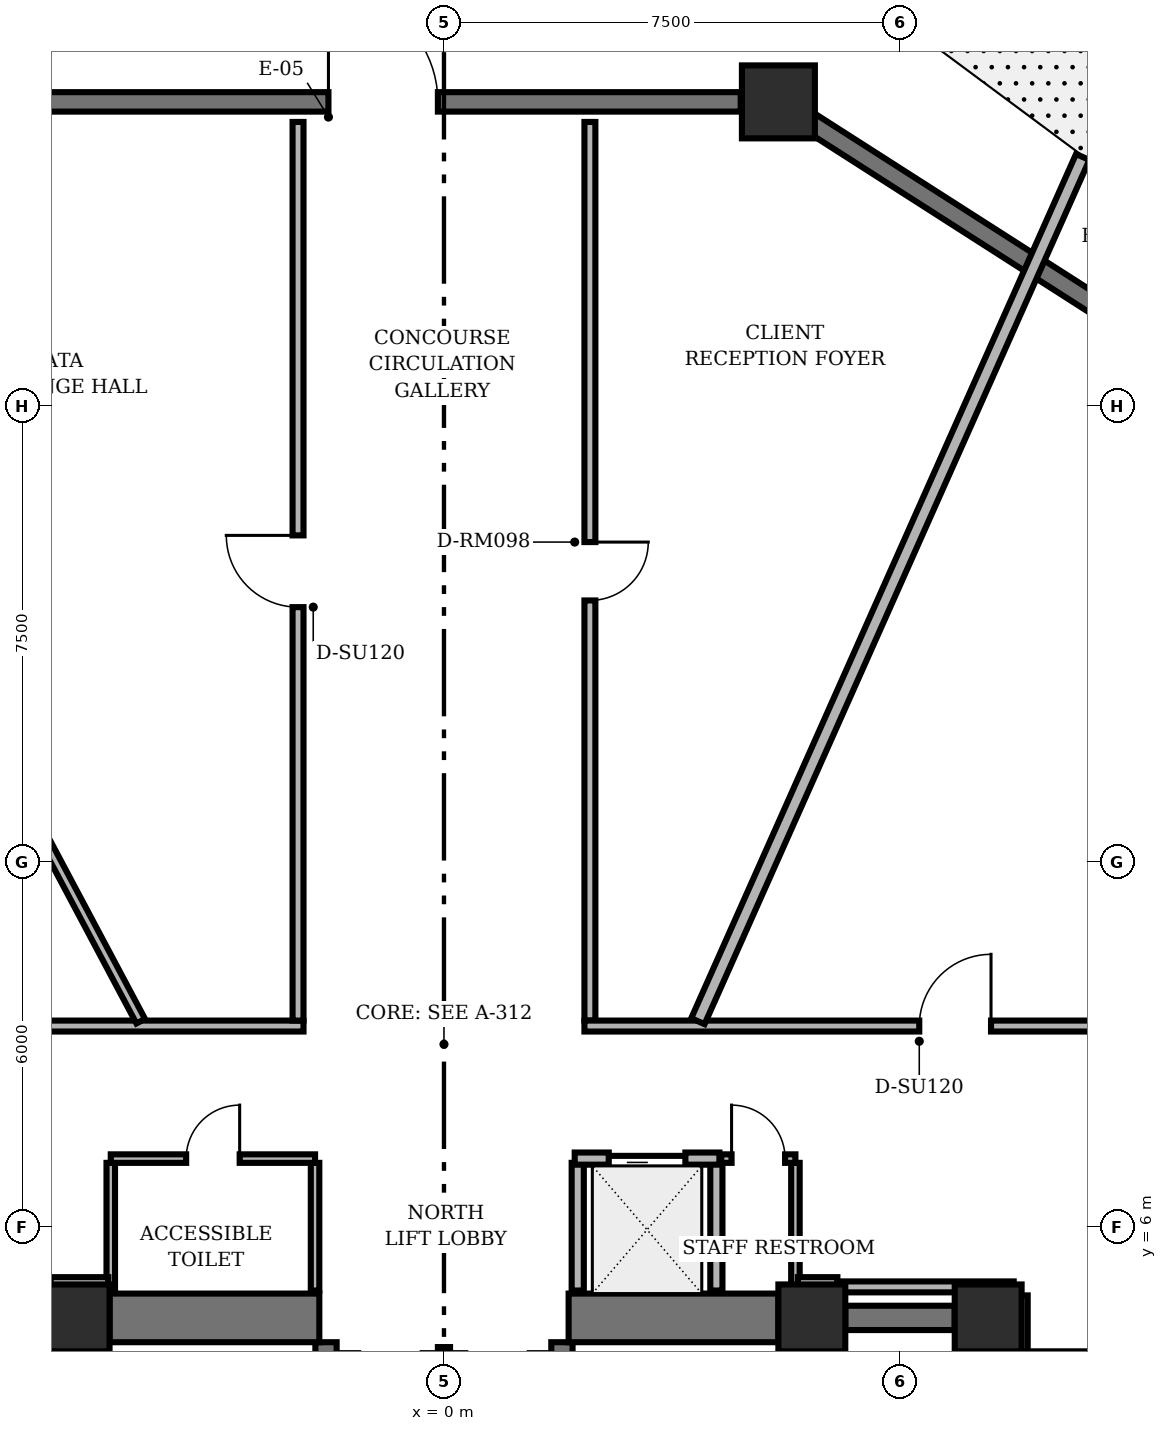
"""IFC4 building model, lengths in metres.
Left out: names, types, materials, properties, quantities, classifications, styles, units other than length and angle.
Written with IfcOpenShell. Run it as: python <this file> out.ifc"""

import sys

from ifc_helpers import new_model, si_unit, direction, frame, frame_2d, origin, origin_2d, place, context, subcontext, project, spatial, rectangle, hollow_rectangle, extrude, element, fill, save


model = new_model("IFC4")
c1 = context("Model", 3, precision=1e-05, world=origin(), true_north=direction((0.0, 1.0)))
c2 = subcontext(c1, "Body", "Model", "MODEL_VIEW")
j1 = project(units=[si_unit("LENGTHUNIT", "METRE"), si_unit("PLANEANGLEUNIT", "RADIAN")], contexts=[c1])
p1 = place(None, origin())
s1 = spatial("IfcSite", under=j1, at=p1, CompositionType="ELEMENT")
p2 = place(p1, origin())
s2 = spatial("IfcBuilding", under=s1, at=p2, CompositionType="ELEMENT")
p3 = place(p2, origin())
s3 = spatial("IfcBuildingStorey", under=s2, at=p3, CompositionType="ELEMENT", Elevation=0.0)
for number, where, z_axis, x_axis in (
    (1, (-6.05, 4.5, 0.0), (0.0, 0.0, 1.0), (1.0, 0.0, 0.0)),
    (2, (6.05, 4.5, 0.0), (0.0, 0.0, 1.0), (1.0, 0.0, 0.0)),
    (3, (8.95, 4.5, 0.0), (0.0, 0.0, 1.0), (1.0, 0.0, 0.0)),
):
    element("IfcColumn", number, at=place(p3, frame(where, z_axis=z_axis, x_axis=x_axis)), inside=s3, PredefinedType="COLUMN", context=c2, shape_type="SweptSolid", body=[
        extrude(hollow_rectangle(XDim=1.1, YDim=1.1, WallThickness=0.07, InnerFilletRadius=0.02, OuterFilletRadius=0.04, at=origin_2d()), origin(), (0.0, 0.0, 1.0), 4.8),
    ])
for number, where, z_axis, x_axis in (
    (4, (-1.94, -4.1, 0.0), (0.0, 0.0, 1.0), (0.0, 1.0, 0.0)),
    (5, (1.94, -4.1, 0.0), (0.0, 0.0, 1.0), (0.0, 1.0, 0.0)),
):
    element("IfcWall", number, at=place(p3, frame(where, z_axis=z_axis, x_axis=x_axis)), inside=s3, PredefinedType="SHEAR", context=c2, shape_type="SweptSolid", body=[
        extrude(rectangle(XDim=8.2, YDim=0.35, at=frame_2d((4.1, 0.0))), origin(), (0.0, 0.0, 1.0), 4.498),
    ])
for number, where, z_axis, x_axis in (
    (6, (-5.5, 4.5, 0.0), (0.0, 0.0, 1.0), (1.0, 0.0, 0.0)),
    (7, (2.05, 4.5, 0.0), (0.0, 0.0, 1.0), (1.0, 0.0, 0.0)),
):
    element("IfcWall", number, at=place(p3, frame(where, z_axis=z_axis, x_axis=x_axis)), inside=s3, PredefinedType="SHEAR", context=c2, shape_type="SweptSolid", body=[
        extrude(rectangle(XDim=3.45, YDim=0.8, at=frame_2d((1.725, 0.0))), origin(), (0.0, 0.0, 1.0), 4.498),
    ])
p4 = place(p3, frame((8.95, -3.75, 0.0), z_axis=(0.0, 0.0, 1.0), x_axis=(0.0, 1.0, 0.0)))
e8 = element("IfcWall", 8, at=p4, inside=s3, PredefinedType="SHEAR", context=c2, shape_type="SweptSolid", body=[
    extrude(rectangle(XDim=7.7, YDim=0.8, at=frame_2d((3.85, 0.0))), origin(), (0.0, 0.0, 1.0), 4.498),
])
p5 = place(p4, frame((0.55, 0.0, 0.0)))
e9 = element("IfcOpeningElement", 9, at=p5, cuts=e8, PredefinedType="OPENING", context=c2, shape_type="SweptSolid", body=[
    extrude(rectangle(XDim=1.06, YDim=2.04, at=frame_2d((0.53, 1.02))), frame((0.0, 0.41, 0.0), z_axis=(0.0, -1.0, 0.0), x_axis=(1.0, 0.0, 0.0)), (0.0, 0.0, 1.0), 0.82),
])
p6 = place(p4, frame((3.32, 0.0, 0.0)))
e10 = element("IfcOpeningElement", 10, at=p6, cuts=e8, PredefinedType="OPENING", context=c2, shape_type="SweptSolid", body=[
    extrude(rectangle(XDim=1.06, YDim=2.04, at=frame_2d((0.53, 1.02))), frame((0.0, 0.41, 0.0), z_axis=(0.0, -1.0, 0.0), x_axis=(1.0, 0.0, 0.0)), (0.0, 0.0, 1.0), 0.82),
])
p7 = place(p4, frame((6.08, 0.0, 0.0)))
e11 = element("IfcOpeningElement", 11, at=p7, cuts=e8, PredefinedType="OPENING", context=c2, shape_type="SweptSolid", body=[
    extrude(rectangle(XDim=1.06, YDim=2.04, at=frame_2d((0.53, 1.02))), frame((0.0, 0.41, 0.0), z_axis=(0.0, -1.0, 0.0), x_axis=(1.0, 0.0, 0.0)), (0.0, 0.0, 1.0), 0.82),
])
p8 = place(p3, frame((6.6, 4.5, 0.0), z_axis=(0.0, 0.0, 1.0), x_axis=(1.0, 0.0, 0.0)))
e12 = element("IfcWall", 12, at=p8, inside=s3, PredefinedType="SHEAR", context=c2, shape_type="SweptSolid", body=[
    extrude(rectangle(XDim=1.8, YDim=0.4, at=frame_2d((0.9, 0.0))), origin(), (0.0, 0.0, 1.0), 4.498),
])
p9 = place(p3, frame((5.5, 24.5, 0.0), z_axis=(0.0, 0.0, 1.0), x_axis=(1.0, 0.0, 0.0)))
e13 = element("IfcColumn", 13, at=p9, inside=s3, PredefinedType="COLUMN", context=c2, shape_type="SweptSolid", body=[
    extrude(rectangle(XDim=1.2, YDim=1.2, at=origin_2d()), origin(), (0.0, 0.0, 1.0), 4.8),
])
p10 = place(p3, frame((6.022, 24.166, 0.0), z_axis=(0.0, 0.0, 1.0), x_axis=(0.842272052664, -0.539052677667, 0.0)))
e14 = element("IfcWall", 14, at=p10, inside=s3, PredefinedType="SOLIDWALL", context=c2, shape_type="SweptSolid", body=[
    extrude(rectangle(XDim=13.601, YDim=0.32, at=frame_2d((6.8, 0.0))), origin(), (0.0, 0.0, 1.0), 3.868),
])
p11 = place(p10, frame((5.9, 0.0, 0.0)))
e15 = element("IfcOpeningElement", 15, at=p11, cuts=e14, PredefinedType="OPENING", context=c2, shape_type="SweptSolid", body=[
    extrude(rectangle(XDim=1.8, YDim=2.3, at=frame_2d((0.9, 1.15))), frame((0.0, 0.17, 0.0), z_axis=(0.0, -1.0, 0.0), x_axis=(1.0, 0.0, 0.0)), (0.0, 0.0, 1.0), 0.34),
])
p12 = place(p3, frame((-6.88, 24.5, 0.0), z_axis=(0.0, 0.0, 1.0), x_axis=(1.0, 0.0, 0.0)))
e16 = element("IfcWall", 16, at=p12, inside=s3, PredefinedType="SOLIDWALL", context=c2, shape_type="SweptSolid", body=[
    extrude(rectangle(XDim=11.76, YDim=0.32, at=frame_2d((5.88, 0.0))), origin(), (0.0, 0.0, 1.0), 3.868),
])
p13 = place(p12, frame((4.98, 0.0, 0.0)))
e17 = element("IfcOpeningElement", 17, at=p13, cuts=e16, PredefinedType="OPENING", context=c2, shape_type="SweptSolid", body=[
    extrude(rectangle(XDim=1.8, YDim=2.3, at=frame_2d((0.9, 1.15))), frame((0.0, 0.17, 0.0), z_axis=(0.0, -1.0, 0.0), x_axis=(1.0, 0.0, 0.0)), (0.0, 0.0, 1.0), 0.34),
])
p14 = place(p3, frame((0.0, 1.25, 0.0), z_axis=(0.0, 0.0, 1.0), x_axis=(0.0, 1.0, 0.0)))
e18 = element("IfcWall", 18, at=p14, inside=s3, PredefinedType="PARTITIONING", context=c2, shape_type="SweptSolid", body=[
    extrude(rectangle(XDim=2.77, YDim=0.2, at=frame_2d((1.385, 0.0))), origin(), (0.0, 0.0, 1.0), 4.473),
])
for number, where, z_axis, x_axis in (
    (19, (2.2, 4.95, 0.0), (0.0, 0.0, 1.0), (0.0, 1.0, 0.0)),
    (20, (4.48, 4.95, 0.0), (0.0, 0.0, 1.0), (0.0, 1.0, 0.0)),
):
    element("IfcWall", number, at=place(p3, frame(where, z_axis=z_axis, x_axis=x_axis)), inside=s3, PredefinedType="PARTITIONING", context=c2, shape_type="SweptSolid", body=[
        extrude(rectangle(XDim=2.1, YDim=0.2, at=frame_2d((1.05, 0.0))), origin(), (0.0, 0.0, 1.0), 4.473),
    ])
p15 = place(p3, frame((2.15, 7.12, 0.0), z_axis=(0.0, 0.0, 1.0), x_axis=(1.0, 0.0, 0.0)))
e21 = element("IfcWall", 21, at=p15, inside=s3, PredefinedType="PARTITIONING", context=c2, shape_type="SweptSolid", body=[
    extrude(rectangle(XDim=2.38, YDim=0.2, at=frame_2d((1.19, 0.0))), origin(), (0.0, 0.0, 1.0), 4.473),
])
p16 = place(p15, frame((0.56, 0.0, 0.0)))
e22 = element("IfcOpeningElement", 22, at=p16, cuts=e21, PredefinedType="OPENING", context=c2, shape_type="SweptSolid", body=[
    extrude(rectangle(XDim=1.26, YDim=2.06, at=frame_2d((0.63, 1.03))), frame((0.0, 0.11, 0.0), z_axis=(0.0, -1.0, 0.0), x_axis=(1.0, 0.0, 0.0)), (0.0, 0.0, 1.0), 0.22),
])
for number, where, z_axis, x_axis in (
    (23, (-5.48, 4.95, 0.0), (0.0, 0.0, 1.0), (0.0, 1.0, 0.0)),
    (24, (-2.12, 4.95, 0.0), (0.0, 0.0, 1.0), (0.0, 1.0, 0.0)),
):
    element("IfcWall", number, at=place(p3, frame(where, z_axis=z_axis, x_axis=x_axis)), inside=s3, PredefinedType="PARTITIONING", context=c2, shape_type="SweptSolid", body=[
        extrude(rectangle(XDim=2.1, YDim=0.14, at=frame_2d((1.05, 0.0))), origin(), (0.0, 0.0, 1.0), 4.473),
    ])
p17 = place(p3, frame((-5.48, 7.12, 0.0), z_axis=(0.0, 0.0, 1.0), x_axis=(1.0, 0.0, 0.0)))
e25 = element("IfcWall", 25, at=p17, inside=s3, PredefinedType="PARTITIONING", context=c2, shape_type="SweptSolid", body=[
    extrude(rectangle(XDim=3.36, YDim=0.14, at=frame_2d((1.68, 0.0))), origin(), (0.0, 0.0, 1.0), 4.473),
])
p18 = place(p17, frame((1.24, 0.0, 0.0)))
e26 = element("IfcOpeningElement", 26, at=p18, cuts=e25, PredefinedType="OPENING", context=c2, shape_type="SweptSolid", body=[
    extrude(rectangle(XDim=0.88, YDim=2.02, at=frame_2d((0.44, 1.01))), frame((0.0, 0.08, 0.0), z_axis=(0.0, -1.0, 0.0), x_axis=(1.0, 0.0, 0.0)), (0.0, 0.0, 1.0), 0.16),
])
p19 = place(p3, frame((5.78, 4.95, 0.0), z_axis=(0.0, 0.0, 1.0), x_axis=(0.0, 1.0, 0.0)))
e27 = element("IfcWall", 27, at=p19, inside=s3, PredefinedType="PARTITIONING", context=c2, shape_type="SweptSolid", body=[
    extrude(rectangle(XDim=2.1, YDim=0.14, at=frame_2d((1.05, 0.0))), origin(), (0.0, 0.0, 1.0), 3.598),
])
p20 = place(p3, frame((4.56, 7.12, 0.0), z_axis=(0.0, 0.0, 1.0), x_axis=(1.0, 0.0, 0.0)))
e28 = element("IfcWall", 28, at=p20, inside=s3, PredefinedType="PARTITIONING", context=c2, shape_type="SweptSolid", body=[
    extrude(rectangle(XDim=1.22, YDim=0.14, at=frame_2d((0.61, 0.0))), origin(), (0.0, 0.0, 1.0), 4.473),
])
p21 = place(p20, frame((0.17, 0.0, 0.0)))
e29 = element("IfcOpeningElement", 29, at=p21, cuts=e28, PredefinedType="OPENING", context=c2, shape_type="SweptSolid", body=[
    extrude(rectangle(XDim=0.88, YDim=2.02, at=frame_2d((0.44, 1.01))), frame((0.0, 0.08, 0.0), z_axis=(0.0, -1.0, 0.0), x_axis=(1.0, 0.0, 0.0)), (0.0, 0.0, 1.0), 0.16),
])
p22 = place(p3, frame((-12.89, 9.3, 0.0), z_axis=(0.0, 0.0, 1.0), x_axis=(1.0, 0.0, 0.0)))
e30 = element("IfcWall", 30, at=p22, inside=s3, PredefinedType="PARTITIONING", context=c2, shape_type="SweptSolid", body=[
    extrude(rectangle(XDim=10.58, YDim=0.18, at=frame_2d((5.29, 0.0))), origin(), (0.0, 0.0, 1.0), 3.987),
])
p23 = place(p22, frame((3.566, 0.0, 0.0)))
e31 = element("IfcOpeningElement", 31, at=p23, cuts=e30, PredefinedType="OPENING", context=c2, shape_type="SweptSolid", body=[
    extrude(rectangle(XDim=1.02, YDim=2.02, at=frame_2d((0.51, 1.01))), frame((0.0, 0.1, 0.0), z_axis=(0.0, -1.0, 0.0), x_axis=(1.0, 0.0, 0.0)), (0.0, 0.0, 1.0), 0.2),
])
p24 = place(p3, frame((-2.4, 9.39, 0.0), z_axis=(0.0, 0.0, 1.0), x_axis=(0.0, 1.0, 0.0)))
e32 = element("IfcWall", 32, at=p24, inside=s3, PredefinedType="PARTITIONING", context=c2, shape_type="SweptSolid", body=[
    extrude(rectangle(XDim=14.78, YDim=0.18, at=frame_2d((7.39, 0.0))), origin(), (0.0, 0.0, 1.0), 4.473),
])
p25 = place(p24, frame((6.8, 0.0, 0.0)))
e33 = element("IfcOpeningElement", 33, at=p25, cuts=e32, PredefinedType="OPENING", context=c2, shape_type="SweptSolid", body=[
    extrude(rectangle(XDim=1.18, YDim=2.02, at=frame_2d((0.59, 1.01))), frame((0.0, 0.1, 0.0), z_axis=(0.0, -1.0, 0.0), x_axis=(1.0, 0.0, 0.0)), (0.0, 0.0, 1.0), 0.2),
])
p26 = place(p3, frame((2.4, 24.17, 0.0), z_axis=(0.0, 0.0, 1.0), x_axis=(0.0, -1.0, 0.0)))
e34 = element("IfcWall", 34, at=p26, inside=s3, PredefinedType="PARTITIONING", context=c2, shape_type="SweptSolid", body=[
    extrude(rectangle(XDim=14.78, YDim=0.18, at=frame_2d((7.39, 0.0))), origin(), (0.0, 0.0, 1.0), 4.473),
])
p27 = place(p26, frame((6.91, 0.0, 0.0)))
e35 = element("IfcOpeningElement", 35, at=p27, cuts=e34, PredefinedType="OPENING", context=c2, shape_type="SweptSolid", body=[
    extrude(rectangle(XDim=0.96, YDim=2.02, at=frame_2d((0.48, 1.01))), frame((0.0, 0.1, 0.0), z_axis=(0.0, -1.0, 0.0), x_axis=(1.0, 0.0, 0.0)), (0.0, 0.0, 1.0), 0.2),
])
p28 = place(p3, frame((2.31, 9.3, 0.0), z_axis=(0.0, 0.0, 1.0), x_axis=(1.0, 0.0, 0.0)))
e36 = element("IfcWall", 36, at=p28, inside=s3, PredefinedType="PARTITIONING", context=c2, shape_type="SweptSolid", body=[
    extrude(rectangle(XDim=10.58, YDim=0.18, at=frame_2d((5.29, 0.0))), origin(), (0.0, 0.0, 1.0), 3.987),
])
p29 = place(p28, frame((5.507, 0.0, 0.0)))
e37 = element("IfcOpeningElement", 37, at=p29, cuts=e36, PredefinedType="OPENING", context=c2, shape_type="SweptSolid", body=[
    extrude(rectangle(XDim=1.18, YDim=2.02, at=frame_2d((0.59, 1.01))), frame((0.0, 0.1, 0.0), z_axis=(0.0, -1.0, 0.0), x_axis=(1.0, 0.0, 0.0)), (0.0, 0.0, 1.0), 0.2),
])
p30 = place(p3, frame((10.97, 3.86, 0.0), z_axis=(0.0, 0.0, 1.0), x_axis=(-1.0, 0.0, 0.0)))
e38 = element("IfcWall", 38, at=p30, inside=s3, PredefinedType="PARTITIONING", context=c2, shape_type="SweptSolid", body=[
    extrude(rectangle(XDim=1.55, YDim=0.18, at=frame_2d((0.775, 0.0))), origin(), (0.0, 0.0, 1.0), 4.473),
])
p31 = place(p3, frame((9.51, 3.95, 0.0), z_axis=(0.0, 0.0, 1.0), x_axis=(0.0, 1.0, 0.0)))
e39 = element("IfcWall", 39, at=p31, inside=s3, PredefinedType="PARTITIONING", context=c2, shape_type="SweptSolid", body=[
    extrude(rectangle(XDim=0.92, YDim=0.18, at=frame_2d((0.46, 0.0))), origin(), (0.0, 0.0, 1.0), 4.473),
])
p32 = place(p3, frame((9.37, 5.01, 0.0), z_axis=(0.0, 0.0, 1.0), x_axis=(-1.0, 0.0, 0.0)))
e40 = element("IfcWall", 40, at=p32, inside=s3, PredefinedType="PARTITIONING", context=c2, shape_type="SweptSolid", body=[
    extrude(rectangle(XDim=2.808, YDim=0.18, at=frame_2d((1.404, 0.0))), origin(), (0.0, 0.0, 1.0), 4.473),
])
p33 = place(p3, frame((6.47, 5.08, 0.0), z_axis=(0.0, 0.0, 1.0), x_axis=(-1.0, 0.0, 0.0)))
e41 = element("IfcWall", 41, at=p33, inside=s3, PredefinedType="PARTITIONING", context=c2, shape_type="SweptSolid", body=[
    extrude(rectangle(XDim=0.65, YDim=0.18, at=frame_2d((0.325, 0.0))), origin(), (0.0, 0.0, 1.0), 4.473),
])
p34 = place(p3, frame((-5.52, 5.08, 0.0), z_axis=(0.0, 0.0, 1.0), x_axis=(-1.0, 0.0, 0.0)))
e42 = element("IfcWall", 42, at=p34, inside=s3, PredefinedType="PARTITIONING", context=c2, shape_type="SweptSolid", body=[
    extrude(rectangle(XDim=0.95, YDim=0.18, at=frame_2d((0.475, 0.0))), origin(), (0.0, 0.0, 1.0), 4.473),
])
p35 = place(p3, frame((4.176, 9.38, 0.0), z_axis=(0.0, 0.0, 1.0), x_axis=(0.406726574704, 0.913549940304, 0.0)))
e43 = element("IfcWall", 43, at=p35, inside=s3, PredefinedType="PARTITIONING", context=c2, shape_type="SweptSolid", body=[
    extrude(rectangle(XDim=15.559, YDim=0.24, at=frame_2d((7.779, 0.0))), origin(), (0.0, 0.0, 1.0), 4.473),
])
p36 = place(p3, frame((-4.987, 9.38, 0.0), z_axis=(0.0, 0.0, 1.0), x_axis=(-0.469474122014, 0.882946232088, 0.0)))
e44 = element("IfcWall", 44, at=p36, inside=s3, PredefinedType="PARTITIONING", context=c2, shape_type="SweptSolid", body=[
    extrude(rectangle(XDim=19.888, YDim=0.16, at=frame_2d((9.944, 0.0))), origin(), (0.0, 0.0, 1.0), 4.473),
])
p37 = place(p13, origin())
e45 = element("IfcDoor", 45, at=p37, inside=s3, OperationType="SINGLE_SWING_LEFT", PredefinedType="DOOR", context=c2, shape_type="SweptSolid", body=[
    extrude(rectangle(XDim=1.8, YDim=2.3, at=frame_2d((0.9, 1.15))), frame((0.0, 0.025, 0.0), z_axis=(0.0, -1.0, 0.0), x_axis=(1.0, 0.0, 0.0)), (0.0, 0.0, 1.0), 0.05),
])
fill(e17, e45)
p38 = place(p16, origin())
e46 = element("IfcDoor", 46, at=p38, inside=s3, OperationType="SLIDING_TO_LEFT", PredefinedType="DOOR", context=c2, shape_type="SweptSolid", body=[
    extrude(rectangle(XDim=1.26, YDim=2.06, at=frame_2d((0.63, 1.03))), frame((0.0, 0.025, 0.0), z_axis=(0.0, -1.0, 0.0), x_axis=(1.0, 0.0, 0.0)), (0.0, 0.0, 1.0), 0.05),
])
fill(e22, e46)
p39 = place(p18, origin())
e47 = element("IfcDoor", 47, at=p39, inside=s3, OperationType="SINGLE_SWING_RIGHT", PredefinedType="DOOR", context=c2, shape_type="SweptSolid", body=[
    extrude(rectangle(XDim=0.88, YDim=2.02, at=frame_2d((0.44, 1.01))), frame((0.0, 0.025, 0.0), z_axis=(0.0, -1.0, 0.0), x_axis=(1.0, 0.0, 0.0)), (0.0, 0.0, 1.0), 0.05),
])
fill(e26, e47)
p40 = place(p21, origin())
e48 = element("IfcDoor", 48, at=p40, inside=s3, OperationType="SINGLE_SWING_LEFT", PredefinedType="DOOR", context=c2, shape_type="SweptSolid", body=[
    extrude(rectangle(XDim=0.88, YDim=2.02, at=frame_2d((0.44, 1.01))), frame((0.0, 0.025, 0.0), z_axis=(0.0, -1.0, 0.0), x_axis=(1.0, 0.0, 0.0)), (0.0, 0.0, 1.0), 0.05),
])
fill(e29, e48)
p41 = place(p29, origin())
e49 = element("IfcDoor", 49, at=p41, inside=s3, OperationType="SINGLE_SWING_RIGHT", PredefinedType="DOOR", context=c2, shape_type="SweptSolid", body=[
    extrude(rectangle(XDim=1.18, YDim=2.02, at=frame_2d((0.59, 1.01))), frame((0.0, 0.025, 0.0), z_axis=(0.0, -1.0, 0.0), x_axis=(1.0, 0.0, 0.0)), (0.0, 0.0, 1.0), 0.05),
])
fill(e37, e49)
p42 = place(p27, origin())
e50 = element("IfcDoor", 50, at=p42, inside=s3, OperationType="SINGLE_SWING_LEFT", PredefinedType="DOOR", context=c2, shape_type="SweptSolid", body=[
    extrude(rectangle(XDim=0.96, YDim=2.02, at=frame_2d((0.48, 1.01))), frame((0.0, 0.025, 0.0), z_axis=(0.0, -1.0, 0.0), x_axis=(1.0, 0.0, 0.0)), (0.0, 0.0, 1.0), 0.05),
])
fill(e35, e50)
p43 = place(p25, origin())
e51 = element("IfcDoor", 51, at=p43, inside=s3, OperationType="SINGLE_SWING_RIGHT", PredefinedType="DOOR", context=c2, shape_type="SweptSolid", body=[
    extrude(rectangle(XDim=1.18, YDim=2.02, at=frame_2d((0.59, 1.01))), frame((0.0, 0.025, 0.0), z_axis=(0.0, -1.0, 0.0), x_axis=(1.0, 0.0, 0.0)), (0.0, 0.0, 1.0), 0.05),
])
fill(e33, e51)
save(model, sys.argv[1])
